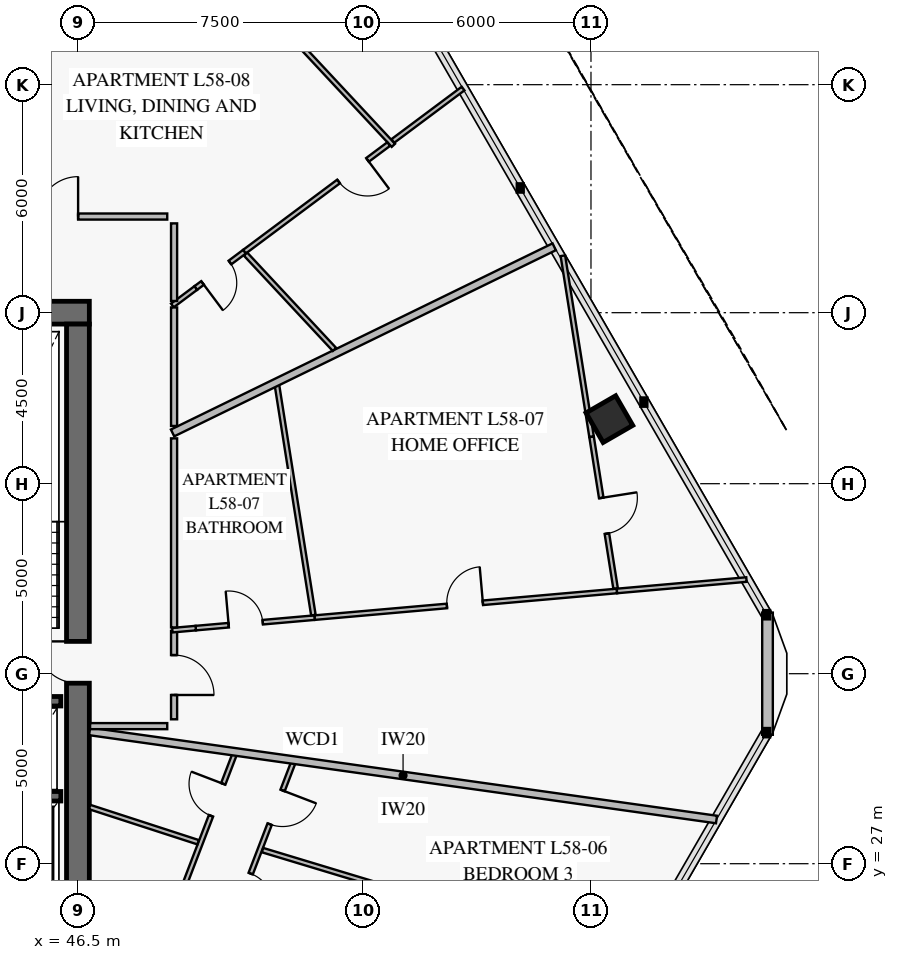
"""IFC4 building model, lengths in metres.
Left out: names, types, materials, properties, quantities, classifications, styles, units other than length and angle.
Written with IfcOpenShell. Run it as: python <this file> out.ifc"""

import sys

from ifc_helpers import new_model, si_unit, direction, frame, frame_2d, origin, origin_2d, place, context, subcontext, project, spatial, rectangle, extrude, element, fill, save


model = new_model("IFC4")
c1 = context("Model", 3, precision=1e-05, world=origin(), true_north=direction((0.0, 1.0)))
c2 = subcontext(c1, "Body", "Model", "MODEL_VIEW")
j1 = project(units=[si_unit("LENGTHUNIT", "METRE"), si_unit("PLANEANGLEUNIT", "RADIAN")], contexts=[c1])
p1 = place(None, origin())
s1 = spatial("IfcSite", under=j1, at=p1, CompositionType="ELEMENT")
p2 = place(p1, origin())
s2 = spatial("IfcBuilding", under=s1, at=p2, CompositionType="ELEMENT")
p3 = place(p2, frame((0.0, 0.0, 231.2)))
s3 = spatial("IfcBuildingStorey", under=s2, at=p3, CompositionType="ELEMENT", Elevation=231.2)
p4 = place(p3, frame((46.8, 41.5, 0.0), z_axis=(0.0, 0.0, 1.0), x_axis=(-1.0, 0.0, 0.0)))
e1 = element("IfcWall", 1, at=p4, inside=s3, PredefinedType="SHEAR", context=c2, shape_type="SweptSolid", body=[
    extrude(rectangle(XDim=7.85, YDim=0.6, at=frame_2d((3.925, 0.0))), origin(), (0.0, 0.0, 1.0), 3.8),
])
p5 = place(p3, frame((46.5, 22.8, 0.0), z_axis=(0.0, 0.0, 1.0), x_axis=(0.0, 1.0, 0.0)))
e2 = element("IfcWall", 2, at=p5, inside=s3, PredefinedType="SHEAR", context=c2, shape_type="SweptSolid", body=[
    extrude(rectangle(XDim=18.4, YDim=0.6, at=frame_2d((9.2, 0.0))), origin(), (0.0, 0.0, 1.0), 3.8),
])
p6 = place(p5, frame((8.95, 0.0, 0.0)))
e3 = element("IfcOpeningElement", 3, at=p6, cuts=e2, PredefinedType="OPENING", context=c2, shape_type="SweptSolid", body=[
    extrude(rectangle(XDim=1.1, YDim=2.15, at=frame_2d((0.55, 1.075))), frame((0.0, 0.312, 0.0), z_axis=(0.0, -1.0, 0.0), x_axis=(1.0, 0.0, 0.0)), (0.0, 0.0, 1.0), 0.624),
])
p7 = place(p3, frame((60.485, 38.699, 0.0), z_axis=(0.0, 0.0, 1.0), x_axis=(-0.5, 0.866025403784, 0.0)))
e4 = element("IfcColumn", 4, at=p7, inside=s3, PredefinedType="COLUMN", context=c2, shape_type="SweptSolid", body=[
    extrude(rectangle(XDim=0.9, YDim=0.9, at=origin_2d()), origin(), (0.0, 0.0, 1.0), 3.55),
])
p8 = place(p3, frame((64.645, 33.607, 0.0), z_axis=(0.0, 0.0, 1.0), x_axis=(0.0, -1.0, 0.0)))
e5 = element("IfcWall", 5, at=p8, inside=s3, PredefinedType="SOLIDWALL", context=c2, shape_type="SweptSolid", body=[
    extrude(rectangle(XDim=3.215, YDim=0.28, at=frame_2d((1.607, 0.0))), origin(), (0.0, 0.0, 1.0), 3.55),
])
p9 = place(p3, frame((25.95, 31.275, 0.0), z_axis=(0.0, 0.0, 1.0), x_axis=(1.0, 0.0, 0.0)))
e6 = element("IfcWall", 6, at=p9, inside=s3, PredefinedType="SOLIDWALL", context=c2, shape_type="SweptSolid", body=[
    extrude(rectangle(XDim=20.1, YDim=0.25, at=frame_2d((10.05, 0.0))), origin(), (0.0, 0.0, 1.0), 3.8),
])
p10 = place(p9, frame((2.6, 0.0, 0.0)))
e7 = element("IfcOpeningElement", 7, at=p10, cuts=e6, PredefinedType="OPENING", context=c2, shape_type="SweptSolid", body=[
    extrude(rectangle(XDim=1.1, YDim=2.15, at=frame_2d((0.55, 1.075))), frame((0.0, 0.137, 0.0), z_axis=(0.0, -1.0, 0.0), x_axis=(1.0, 0.0, 0.0)), (0.0, 0.0, 1.0), 0.274),
])
p11 = place(p9, frame((10.6, 0.0, 0.0)))
e8 = element("IfcOpeningElement", 8, at=p11, cuts=e6, PredefinedType="OPENING", context=c2, shape_type="SweptSolid", body=[
    extrude(rectangle(XDim=1.1, YDim=2.15, at=frame_2d((0.55, 1.075))), frame((0.0, 0.137, 0.0), z_axis=(0.0, -1.0, 0.0), x_axis=(1.0, 0.0, 0.0)), (0.0, 0.0, 1.0), 0.274),
])
p12 = place(p9, frame((16.35, 0.0, 0.0)))
e9 = element("IfcOpeningElement", 9, at=p12, cuts=e6, PredefinedType="OPENING", context=c2, shape_type="SweptSolid", body=[
    extrude(rectangle(XDim=1.1, YDim=2.15, at=frame_2d((0.55, 1.075))), frame((0.0, 0.137, 0.0), z_axis=(0.0, -1.0, 0.0), x_axis=(1.0, 0.0, 0.0)), (0.0, 0.0, 1.0), 0.274),
])
p13 = place(p3, frame((43.8, 28.775, 0.0), z_axis=(0.0, 0.0, 1.0), x_axis=(1.0, 0.0, 0.0)))
e10 = element("IfcWall", 10, at=p13, inside=s3, PredefinedType="SOLIDWALL", context=c2, shape_type="SweptSolid", body=[
    extrude(rectangle(XDim=2.25, YDim=0.25, at=frame_2d((1.125, 0.0))), origin(), (0.0, 0.0, 1.0), 3.8),
])
p14 = place(p3, frame((48.278, 23.766, 0.0), z_axis=(0.0, 0.0, 1.0), x_axis=(0.358042156754, 0.933705421419, 0.0)))
e11 = element("IfcWall", 11, at=p14, inside=s3, PredefinedType="PARTITIONING", context=c2, shape_type="SweptSolid", body=[
    extrude(rectangle(XDim=6.584, YDim=0.12, at=frame_2d((3.292, 0.0))), origin(), (0.0, 0.0, 1.0), 2.95),
])
p15 = place(p14, frame((1.599, 0.0, 0.0)))
e12 = element("IfcOpeningElement", 12, at=p15, cuts=e11, PredefinedType="OPENING", context=c2, shape_type="SweptSolid", body=[
    extrude(rectangle(XDim=0.95, YDim=2.1, at=frame_2d((0.475, 1.05))), frame((0.0, 0.072, 0.0), z_axis=(0.0, -1.0, 0.0), x_axis=(1.0, 0.0, 0.0)), (0.0, 0.0, 1.0), 0.144),
])
p16 = place(p14, frame((4.814, 0.0, 0.0)))
e13 = element("IfcOpeningElement", 13, at=p16, cuts=e11, PredefinedType="OPENING", context=c2, shape_type="SweptSolid", body=[
    extrude(rectangle(XDim=0.9, YDim=2.1, at=frame_2d((0.45, 1.05))), frame((0.0, 0.072, 0.0), z_axis=(0.0, -1.0, 0.0), x_axis=(1.0, 0.0, 0.0)), (0.0, 0.0, 1.0), 0.144),
])
p17 = place(p3, frame((49.576, 22.908, 0.0), z_axis=(0.0, 0.0, 1.0), x_axis=(0.358041112014, 0.933705822038, 0.0)))
e14 = element("IfcWall", 14, at=p17, inside=s3, PredefinedType="PARTITIONING", context=c2, shape_type="SweptSolid", body=[
    extrude(rectangle(XDim=7.257, YDim=0.12, at=frame_2d((3.629, 0.0))), origin(), (0.0, 0.0, 1.0), 2.95),
])
p18 = place(p17, frame((0.81, 0.0, 0.0)))
e15 = element("IfcOpeningElement", 15, at=p18, cuts=e14, PredefinedType="OPENING", context=c2, shape_type="SweptSolid", body=[
    extrude(rectangle(XDim=0.95, YDim=2.1, at=frame_2d((0.475, 1.05))), frame((0.0, 0.072, 0.0), z_axis=(0.0, -1.0, 0.0), x_axis=(1.0, 0.0, 0.0)), (0.0, 0.0, 1.0), 0.144),
])
p19 = place(p17, frame((3.154, 0.0, 0.0)))
e16 = element("IfcOpeningElement", 16, at=p19, cuts=e14, PredefinedType="OPENING", context=c2, shape_type="SweptSolid", body=[
    extrude(rectangle(XDim=0.95, YDim=2.1, at=frame_2d((0.475, 1.05))), frame((0.0, 0.072, 0.0), z_axis=(0.0, -1.0, 0.0), x_axis=(1.0, 0.0, 0.0)), (0.0, 0.0, 1.0), 0.144),
])
p20 = place(p17, frame((5.497, 0.0, 0.0)))
e17 = element("IfcOpeningElement", 17, at=p20, cuts=e14, PredefinedType="OPENING", context=c2, shape_type="SweptSolid", body=[
    extrude(rectangle(XDim=0.95, YDim=2.1, at=frame_2d((0.475, 1.05))), frame((0.0, 0.072, 0.0), z_axis=(0.0, -1.0, 0.0), x_axis=(1.0, 0.0, 0.0)), (0.0, 0.0, 1.0), 0.144),
])
p21 = place(p3, frame((49.6, 33.199, 0.0), z_axis=(0.0, 0.0, 1.0), x_axis=(0.996134648453, 0.087839411149, 0.0)))
e18 = element("IfcWall", 18, at=p21, inside=s3, PredefinedType="PARTITIONING", context=c2, shape_type="SweptSolid", body=[
    extrude(rectangle(XDim=3.144, YDim=0.12, at=frame_2d((1.572, 0.0))), origin(), (0.0, 0.0, 1.0), 3.55),
])
p22 = place(p21, frame((0.87, 0.0, 0.0)))
e19 = element("IfcOpeningElement", 19, at=p22, cuts=e18, PredefinedType="OPENING", context=c2, shape_type="SweptSolid", body=[
    extrude(rectangle(XDim=0.9, YDim=2.1, at=frame_2d((0.45, 1.05))), frame((0.0, 0.072, 0.0), z_axis=(0.0, -1.0, 0.0), x_axis=(1.0, 0.0, 0.0)), (0.0, 0.0, 1.0), 0.144),
])
p23 = place(p3, frame((52.731, 33.476, 0.0), z_axis=(0.0, 0.0, 1.0), x_axis=(0.996132054935, 0.087868817741, 0.0)))
e20 = element("IfcWall", 20, at=p23, inside=s3, PredefinedType="PARTITIONING", context=c2, shape_type="SweptSolid", body=[
    extrude(rectangle(XDim=7.982, YDim=0.12, at=frame_2d((3.991, 0.0))), origin(), (0.0, 0.0, 1.0), 2.93),
])
p24 = place(p23, frame((3.491, 0.0, 0.0)))
e21 = element("IfcOpeningElement", 21, at=p24, cuts=e20, PredefinedType="OPENING", context=c2, shape_type="SweptSolid", body=[
    extrude(rectangle(XDim=0.95, YDim=2.1, at=frame_2d((0.475, 1.05))), frame((0.0, 0.072, 0.0), z_axis=(0.0, -1.0, 0.0), x_axis=(1.0, 0.0, 0.0)), (0.0, 0.0, 1.0), 0.144),
])
p25 = place(p3, frame((60.648, 34.242, 0.0), z_axis=(0.0, 0.0, 1.0), x_axis=(-0.156452472951, 0.987685488254, 0.0)))
e22 = element("IfcWall", 22, at=p25, inside=s3, PredefinedType="PARTITIONING", context=c2, shape_type="SweptSolid", body=[
    extrude(rectangle(XDim=4.043, YDim=0.12, at=frame_2d((2.021, 0.0))), origin(), (0.0, 0.0, 1.0), 2.93),
])
p26 = place(p25, frame((1.462, 0.0, 0.0)))
e23 = element("IfcOpeningElement", 23, at=p26, cuts=e22, PredefinedType="OPENING", context=c2, shape_type="SweptSolid", body=[
    extrude(rectangle(XDim=0.95, YDim=2.1, at=frame_2d((0.475, 1.05))), frame((0.0, 0.072, 0.0), z_axis=(0.0, -1.0, 0.0), x_axis=(1.0, 0.0, 0.0)), (0.0, 0.0, 1.0), 0.144),
])
p27 = place(p3, frame((49.03, 30.8, 0.0), z_axis=(0.0, 0.0, 1.0), x_axis=(0.0, 1.0, 0.0)))
e24 = element("IfcWall", 24, at=p27, inside=s3, PredefinedType="PARTITIONING", context=c2, shape_type="SweptSolid", body=[
    extrude(rectangle(XDim=2.329, YDim=0.16, at=frame_2d((1.165, 0.0))), origin(), (0.0, 0.0, 1.0), 3.55),
])
p28 = place(p27, frame((0.64, 0.0, 0.0)))
e25 = element("IfcOpeningElement", 25, at=p28, cuts=e24, PredefinedType="OPENING", context=c2, shape_type="SweptSolid", body=[
    extrude(rectangle(XDim=1.05, YDim=2.15, at=frame_2d((0.525, 1.075))), frame((0.0, 0.092, 0.0), z_axis=(0.0, -1.0, 0.0), x_axis=(1.0, 0.0, 0.0)), (0.0, 0.0, 1.0), 0.184),
])
p29 = place(p3, frame((54.8, 45.904, 0.0), z_axis=(0.0, 0.0, 1.0), x_axis=(-0.68198067204, 0.731370195567, 0.0)))
e26 = element("IfcWall", 26, at=p29, inside=s3, PredefinedType="PARTITIONING", context=c2, shape_type="SweptSolid", body=[
    extrude(rectangle(XDim=9.639, YDim=0.12, at=frame_2d((4.82, 0.0))), origin(), (0.0, 0.0, 1.0), 2.95),
])
p30 = place(p29, frame((4.344, 0.0, 0.0)))
e27 = element("IfcOpeningElement", 27, at=p30, cuts=e26, PredefinedType="OPENING", context=c2, shape_type="SweptSolid", body=[
    extrude(rectangle(XDim=0.95, YDim=2.1, at=frame_2d((0.475, 1.05))), frame((0.0, 0.072, 0.0), z_axis=(0.0, -1.0, 0.0), x_axis=(1.0, 0.0, 0.0)), (0.0, 0.0, 1.0), 0.144),
])
p31 = place(p3, frame((49.6, 42.148, 0.0), z_axis=(0.0, 0.0, 1.0), x_axis=(0.801441831829, 0.598072729854, 0.0)))
e28 = element("IfcWall", 28, at=p31, inside=s3, PredefinedType="PARTITIONING", context=c2, shape_type="SweptSolid", body=[
    extrude(rectangle(XDim=1.603, YDim=0.12, at=frame_2d((0.801, 0.0))), origin(), (0.0, 0.0, 1.0), 3.55),
])
p32 = place(p31, frame((0.223, 0.0, 0.0)))
e29 = element("IfcOpeningElement", 29, at=p32, cuts=e28, PredefinedType="OPENING", context=c2, shape_type="SweptSolid", body=[
    extrude(rectangle(XDim=0.9, YDim=2.1, at=frame_2d((0.45, 1.05))), frame((0.0, 0.072, 0.0), z_axis=(0.0, -1.0, 0.0), x_axis=(1.0, 0.0, 0.0)), (0.0, 0.0, 1.0), 0.144),
])
p33 = place(p3, frame((50.885, 43.107, 0.0), z_axis=(0.0, 0.0, 1.0), x_axis=(0.801471130314, 0.598033466684, 0.0)))
e30 = element("IfcWall", 30, at=p33, inside=s3, PredefinedType="PARTITIONING", context=c2, shape_type="SweptSolid", body=[
    extrude(rectangle(XDim=4.732, YDim=0.12, at=frame_2d((2.366, 0.0))), origin(), (0.0, 0.0, 1.0), 3.15),
])
p34 = place(p33, frame((3.087, 0.0, 0.0)))
e31 = element("IfcOpeningElement", 31, at=p34, cuts=e30, PredefinedType="OPENING", context=c2, shape_type="SweptSolid", body=[
    extrude(rectangle(XDim=0.95, YDim=2.1, at=frame_2d((0.475, 1.05))), frame((0.0, 0.072, 0.0), z_axis=(0.0, -1.0, 0.0), x_axis=(1.0, 0.0, 0.0)), (0.0, 0.0, 1.0), 0.144),
])
p35 = place(p3, frame((54.787, 46.018, 0.0), z_axis=(0.0, 0.0, 1.0), x_axis=(0.801420991662, 0.598100655511, 0.0)))
e32 = element("IfcWall", 32, at=p35, inside=s3, PredefinedType="PARTITIONING", context=c2, shape_type="SweptSolid", body=[
    extrude(rectangle(XDim=2.305, YDim=0.12, at=frame_2d((1.153, 0.0))), origin(), (0.0, 0.0, 1.0), 2.93),
])
p36 = place(p3, frame((48.85, 44.03, 0.0), z_axis=(0.0, 0.0, 1.0), x_axis=(-1.0, 0.0, 0.0)))
e33 = element("IfcWall", 33, at=p36, inside=s3, PredefinedType="PARTITIONING", context=c2, shape_type="SweptSolid", body=[
    extrude(rectangle(XDim=5.741, YDim=0.16, at=frame_2d((2.87, 0.0))), origin(), (0.0, 0.0, 1.0), 2.95),
])
p37 = place(p36, frame((2.345, 0.0, 0.0)))
e34 = element("IfcOpeningElement", 34, at=p37, cuts=e33, PredefinedType="OPENING", context=c2, shape_type="SweptSolid", body=[
    extrude(rectangle(XDim=1.05, YDim=2.15, at=frame_2d((0.525, 1.075))), frame((0.0, 0.092, 0.0), z_axis=(0.0, -1.0, 0.0), x_axis=(1.0, 0.0, 0.0)), (0.0, 0.0, 1.0), 0.184),
])
p38 = place(p3, frame((46.808, 28.491, 0.0), z_axis=(0.0, 0.0, 1.0), x_axis=(0.951120145706, -0.308821094538, 0.0)))
e35 = element("IfcWall", 35, at=p38, inside=s3, PredefinedType="PARTITIONING", context=c2, shape_type="SweptSolid", body=[
    extrude(rectangle(XDim=3.0, YDim=0.12, at=frame_2d((1.5, 0.0))), origin(), (0.0, 0.0, 1.0), 3.55),
])
p39 = place(p3, frame((51.356, 27.358, 0.0), z_axis=(0.0, 0.0, 1.0), x_axis=(0.957218811374, -0.289365075903, 0.0)))
e36 = element("IfcWall", 36, at=p39, inside=s3, PredefinedType="PARTITIONING", context=c2, shape_type="SweptSolid", body=[
    extrude(rectangle(XDim=10.223, YDim=0.12, at=frame_2d((5.112, 0.0))), origin(), (0.0, 0.0, 1.0), 2.93),
])
p40 = place(p3, frame((46.808, 30.481, 0.0), z_axis=(0.0, 0.0, 1.0), x_axis=(0.990266776737, -0.139182293739, 0.0)))
e37 = element("IfcWall", 37, at=p40, inside=s3, PredefinedType="PARTITIONING", context=c2, shape_type="SweptSolid", body=[
    extrude(rectangle(XDim=16.657, YDim=0.2, at=frame_2d((8.329, 0.0))), origin(), (0.0, 0.0, 1.0), 2.93),
])
p41 = place(p3, frame((48.985, 33.145, 0.0), z_axis=(0.0, 0.0, 1.0), x_axis=(0.99613900955, 0.0877899405, 0.0)))
e38 = element("IfcWall", 38, at=p41, inside=s3, PredefinedType="PARTITIONING", context=c2, shape_type="SweptSolid", body=[
    extrude(rectangle(XDim=0.617, YDim=0.12, at=frame_2d((0.309, 0.0))), origin(), (0.0, 0.0, 1.0), 3.55),
])
p42 = place(p3, frame((60.683, 34.177, 0.0), z_axis=(0.0, 0.0, 1.0), x_axis=(0.996140317526, 0.087775097826, 0.0)))
e39 = element("IfcWall", 39, at=p42, inside=s3, PredefinedType="PARTITIONING", context=c2, shape_type="SweptSolid", body=[
    extrude(rectangle(XDim=3.421, YDim=0.12, at=frame_2d((1.71, 0.0))), origin(), (0.0, 0.0, 1.0), 3.55),
])
p43 = place(p3, frame((52.696, 33.541, 0.0), z_axis=(0.0, 0.0, 1.0), x_axis=(-0.156398775455, 0.987693992609, 0.0)))
e40 = element("IfcWall", 40, at=p43, inside=s3, PredefinedType="PARTITIONING", context=c2, shape_type="SweptSolid", body=[
    extrude(rectangle(XDim=6.15, YDim=0.12, at=frame_2d((3.075, 0.0))), origin(), (0.0, 0.0, 1.0), 2.95),
])
p44 = place(p3, frame((60.014, 38.24, 0.0), z_axis=(0.0, 0.0, 1.0), x_axis=(-0.15641529171, 0.987691377162, 0.0)))
e41 = element("IfcWall", 41, at=p44, inside=s3, PredefinedType="PARTITIONING", context=c2, shape_type="SweptSolid", body=[
    extrude(rectangle(XDim=4.818, YDim=0.12, at=frame_2d((2.409, 0.0))), origin(), (0.0, 0.0, 1.0), 2.93),
])
p45 = place(p3, frame((48.99, 38.336, 0.0), z_axis=(0.0, 0.0, 1.0), x_axis=(0.898797423647, 0.438364222133, 0.0)))
e42 = element("IfcWall", 42, at=p45, inside=s3, PredefinedType="PARTITIONING", context=c2, shape_type="SweptSolid", body=[
    extrude(rectangle(XDim=11.173, YDim=0.2, at=frame_2d((5.587, 0.0))), origin(), (0.0, 0.0, 1.0), 2.93),
])
p46 = place(p3, frame((48.985, 41.689, 0.0), z_axis=(0.0, 0.0, 1.0), x_axis=(0.801410352198, 0.598114911526, 0.0)))
e43 = element("IfcWall", 43, at=p46, inside=s3, PredefinedType="PARTITIONING", context=c2, shape_type="SweptSolid", body=[
    extrude(rectangle(XDim=0.767, YDim=0.12, at=frame_2d((0.384, 0.0))), origin(), (0.0, 0.0, 1.0), 3.55),
])
p47 = place(p3, frame((53.25, 40.533, 0.0), z_axis=(0.0, 0.0, 1.0), x_axis=(-0.682008737139, 0.731344024701, 0.0)))
e44 = element("IfcWall", 44, at=p47, inside=s3, PredefinedType="PARTITIONING", context=c2, shape_type="SweptSolid", body=[
    extrude(rectangle(XDim=3.429, YDim=0.12, at=frame_2d((1.715, 0.0))), origin(), (0.0, 0.0, 1.0), 3.15),
])
p48 = place(p3, frame((42.922, 43.99, 0.0), z_axis=(0.0, 0.0, 1.0), x_axis=(0.500001103527, 0.866024766662, 0.0)))
e45 = element("IfcWall", 45, at=p48, inside=s3, PredefinedType="PARTITIONING", context=c2, shape_type="SweptSolid", body=[
    extrude(rectangle(XDim=15.168, YDim=0.2, at=frame_2d((7.584, 0.0))), origin(), (0.0, 0.0, 1.0), 2.93),
])
p49 = place(p3, frame((46.82, 30.62, 0.0), z_axis=(0.0, 0.0, 1.0), x_axis=(1.0, 0.0, 0.0)))
e46 = element("IfcWall", 46, at=p49, inside=s3, PredefinedType="PARTITIONING", context=c2, shape_type="SweptSolid", body=[
    extrude(rectangle(XDim=2.03, YDim=0.16, at=frame_2d((1.015, 0.0))), origin(), (0.0, 0.0, 1.0), 3.55),
])
p50 = place(p3, frame((49.03, 33.217, 0.0), z_axis=(0.0, 0.0, 1.0), x_axis=(0.0, 1.0, 0.0)))
e47 = element("IfcWall", 47, at=p50, inside=s3, PredefinedType="PARTITIONING", context=c2, shape_type="SweptSolid", body=[
    extrude(rectangle(XDim=4.976, YDim=0.16, at=frame_2d((2.488, 0.0))), origin(), (0.0, 0.0, 1.0), 2.95),
])
p51 = place(p3, frame((49.03, 41.808, 0.0), z_axis=(0.0, 0.0, 1.0), x_axis=(0.0, 1.0, 0.0)))
e48 = element("IfcWall", 48, at=p51, inside=s3, PredefinedType="PARTITIONING", context=c2, shape_type="SweptSolid", body=[
    extrude(rectangle(XDim=2.042, YDim=0.16, at=frame_2d((1.021, 0.0))), origin(), (0.0, 0.0, 1.0), 3.55),
])
p52 = place(p3, frame((49.03, 38.519, 0.0), z_axis=(0.0, 0.0, 1.0), x_axis=(0.0, 1.0, 0.0)))
e49 = element("IfcWall", 49, at=p52, inside=s3, PredefinedType="PARTITIONING", context=c2, shape_type="SweptSolid", body=[
    extrude(rectangle(XDim=3.119, YDim=0.16, at=frame_2d((1.56, 0.0))), origin(), (0.0, 0.0, 1.0), 3.55),
])
p53 = place(p6, origin())
e50 = element("IfcDoor", 50, at=p53, inside=s3, OperationType="SINGLE_SWING_RIGHT", PredefinedType="USERDEFINED", context=c2, shape_type="SweptSolid", body=[
    extrude(rectangle(XDim=1.1, YDim=2.15, at=frame_2d((0.55, 1.075))), frame((0.0, 0.025, 0.0), z_axis=(0.0, -1.0, 0.0), x_axis=(1.0, 0.0, 0.0)), (0.0, 0.0, 1.0), 0.05),
])
fill(e3, e50)
p54 = place(p16, origin())
e51 = element("IfcDoor", 51, at=p54, inside=s3, OperationType="SINGLE_SWING_RIGHT", PredefinedType="DOOR", context=c2, shape_type="SweptSolid", body=[
    extrude(rectangle(XDim=0.9, YDim=2.1, at=frame_2d((0.45, 1.05))), frame((0.0, 0.025, 0.0), z_axis=(0.0, -1.0, 0.0), x_axis=(1.0, 0.0, 0.0)), (0.0, 0.0, 1.0), 0.05),
])
fill(e13, e51)
p55 = place(p19, frame((0.95, 0.0, 0.0), z_axis=(0.0, 0.0, 1.0), x_axis=(-1.0, 0.0, 0.0)))
e52 = element("IfcDoor", 52, at=p55, inside=s3, OperationType="SINGLE_SWING_RIGHT", PredefinedType="DOOR", context=c2, shape_type="SweptSolid", body=[
    extrude(rectangle(XDim=0.95, YDim=2.1, at=frame_2d((0.475, 1.05))), frame((0.0, 0.025, 0.0), z_axis=(0.0, -1.0, 0.0), x_axis=(1.0, 0.0, 0.0)), (0.0, 0.0, 1.0), 0.05),
])
fill(e16, e52)
p56 = place(p20, frame((0.95, 0.0, 0.0), z_axis=(0.0, 0.0, 1.0), x_axis=(-1.0, 0.0, 0.0)))
e53 = element("IfcDoor", 53, at=p56, inside=s3, OperationType="SINGLE_SWING_LEFT", PredefinedType="DOOR", context=c2, shape_type="SweptSolid", body=[
    extrude(rectangle(XDim=0.95, YDim=2.1, at=frame_2d((0.475, 1.05))), frame((0.0, 0.025, 0.0), z_axis=(0.0, -1.0, 0.0), x_axis=(1.0, 0.0, 0.0)), (0.0, 0.0, 1.0), 0.05),
])
fill(e17, e53)
p57 = place(p22, origin())
e54 = element("IfcDoor", 54, at=p57, inside=s3, OperationType="SINGLE_SWING_LEFT", PredefinedType="DOOR", context=c2, shape_type="SweptSolid", body=[
    extrude(rectangle(XDim=0.9, YDim=2.1, at=frame_2d((0.45, 1.05))), frame((0.0, 0.025, 0.0), z_axis=(0.0, -1.0, 0.0), x_axis=(1.0, 0.0, 0.0)), (0.0, 0.0, 1.0), 0.05),
])
fill(e19, e54)
p58 = place(p24, origin())
e55 = element("IfcDoor", 55, at=p58, inside=s3, OperationType="SINGLE_SWING_RIGHT", PredefinedType="DOOR", context=c2, shape_type="SweptSolid", body=[
    extrude(rectangle(XDim=0.95, YDim=2.1, at=frame_2d((0.475, 1.05))), frame((0.0, 0.025, 0.0), z_axis=(0.0, -1.0, 0.0), x_axis=(1.0, 0.0, 0.0)), (0.0, 0.0, 1.0), 0.05),
])
fill(e21, e55)
p59 = place(p26, frame((0.95, 0.0, 0.0), z_axis=(0.0, 0.0, 1.0), x_axis=(-1.0, 0.0, 0.0)))
e56 = element("IfcDoor", 56, at=p59, inside=s3, OperationType="SINGLE_SWING_LEFT", PredefinedType="DOOR", context=c2, shape_type="SweptSolid", body=[
    extrude(rectangle(XDim=0.95, YDim=2.1, at=frame_2d((0.475, 1.05))), frame((0.0, 0.025, 0.0), z_axis=(0.0, -1.0, 0.0), x_axis=(1.0, 0.0, 0.0)), (0.0, 0.0, 1.0), 0.05),
])
fill(e23, e56)
p60 = place(p28, frame((1.05, 0.0, 0.0), z_axis=(0.0, 0.0, 1.0), x_axis=(-1.0, 0.0, 0.0)))
e57 = element("IfcDoor", 57, at=p60, inside=s3, OperationType="SINGLE_SWING_RIGHT", PredefinedType="DOOR", context=c2, shape_type="SweptSolid", body=[
    extrude(rectangle(XDim=1.05, YDim=2.15, at=frame_2d((0.525, 1.075))), frame((0.0, 0.025, 0.0), z_axis=(0.0, -1.0, 0.0), x_axis=(1.0, 0.0, 0.0)), (0.0, 0.0, 1.0), 0.05),
])
fill(e25, e57)
p61 = place(p32, frame((0.9, 0.0, 0.0), z_axis=(0.0, 0.0, 1.0), x_axis=(-1.0, 0.0, 0.0)))
e58 = element("IfcDoor", 58, at=p61, inside=s3, OperationType="SINGLE_SWING_RIGHT", PredefinedType="DOOR", context=c2, shape_type="SweptSolid", body=[
    extrude(rectangle(XDim=0.9, YDim=2.1, at=frame_2d((0.45, 1.05))), frame((0.0, 0.025, 0.0), z_axis=(0.0, -1.0, 0.0), x_axis=(1.0, 0.0, 0.0)), (0.0, 0.0, 1.0), 0.05),
])
fill(e29, e58)
p62 = place(p34, frame((0.95, 0.0, 0.0), z_axis=(0.0, 0.0, 1.0), x_axis=(-1.0, 0.0, 0.0)))
e59 = element("IfcDoor", 59, at=p62, inside=s3, OperationType="SINGLE_SWING_LEFT", PredefinedType="DOOR", context=c2, shape_type="SweptSolid", body=[
    extrude(rectangle(XDim=0.95, YDim=2.1, at=frame_2d((0.475, 1.05))), frame((0.0, 0.025, 0.0), z_axis=(0.0, -1.0, 0.0), x_axis=(1.0, 0.0, 0.0)), (0.0, 0.0, 1.0), 0.05),
])
fill(e31, e59)
p63 = place(p37, frame((1.05, 0.0, 0.0), z_axis=(0.0, 0.0, 1.0), x_axis=(-1.0, 0.0, 0.0)))
e60 = element("IfcDoor", 60, at=p63, inside=s3, OperationType="SINGLE_SWING_RIGHT", PredefinedType="DOOR", context=c2, shape_type="SweptSolid", body=[
    extrude(rectangle(XDim=1.05, YDim=2.15, at=frame_2d((0.525, 1.075))), frame((0.0, 0.025, 0.0), z_axis=(0.0, -1.0, 0.0), x_axis=(1.0, 0.0, 0.0)), (0.0, 0.0, 1.0), 0.05),
])
fill(e34, e60)
save(model, sys.argv[1])
